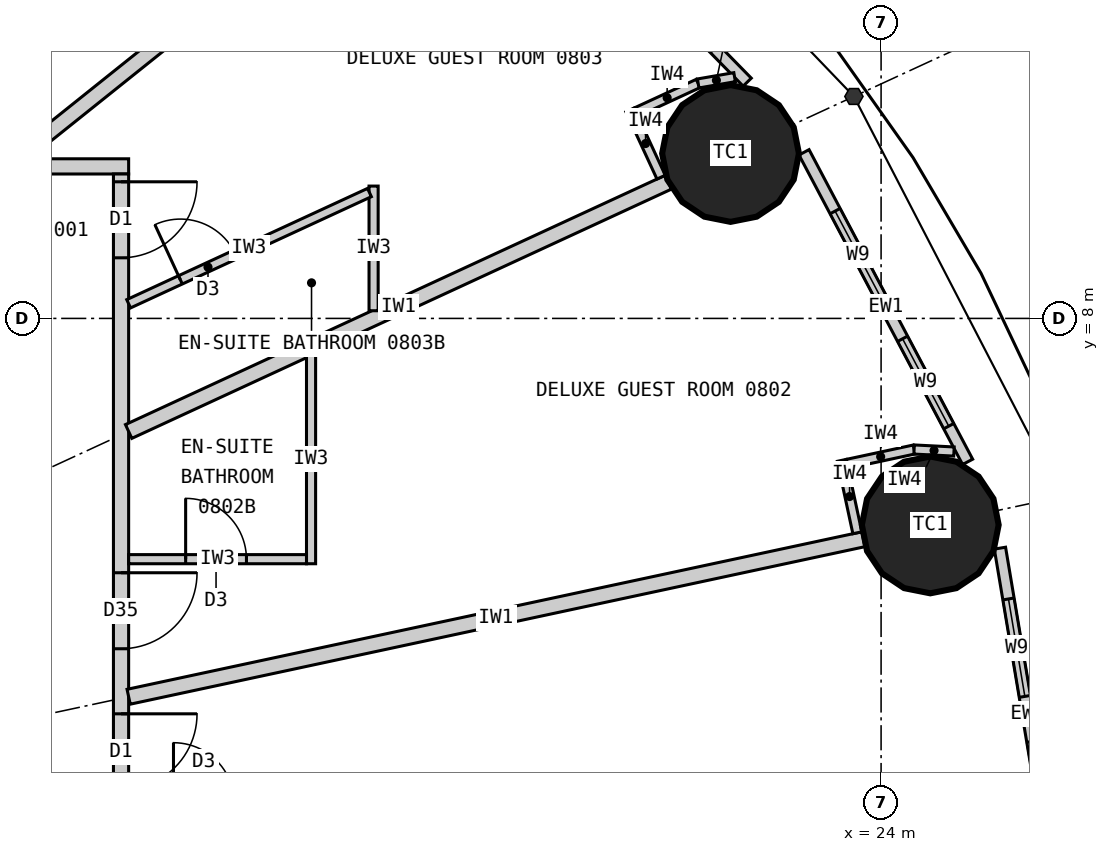
"""IFC4 building model, lengths in metres.
Left out: names, types, materials, properties, quantities, classifications, styles, units other than length and angle.
Written with IfcOpenShell. Run it as: python <this file> out.ifc"""

import sys

from ifc_helpers import new_model, si_unit, direction, frame, frame_2d, origin, origin_2d, place, context, subcontext, project, spatial, rectangle, circle, extrude, element, fill, save


model = new_model("IFC4")
c1 = context("Model", 3, precision=1e-05, world=origin(), true_north=direction((0.0, 1.0)))
c2 = subcontext(c1, "Body", "Model", "MODEL_VIEW")
j1 = project(units=[si_unit("LENGTHUNIT", "METRE"), si_unit("PLANEANGLEUNIT", "RADIAN")], contexts=[c1])
p1 = place(None, origin())
s1 = spatial("IfcSite", under=j1, at=p1, CompositionType="ELEMENT")
p2 = place(p1, origin())
s2 = spatial("IfcBuilding", under=s1, at=p2, CompositionType="ELEMENT")
p3 = place(p2, frame((0.0, 0.0, 39.3)))
s3 = spatial("IfcBuildingStorey", under=s2, at=p3, CompositionType="ELEMENT", Elevation=39.3)
for number, where, z_axis, x_axis in (
    (1, (24.647, 5.283, 0.0), (0.0, 0.0, 1.0), (1.0, 0.0, 0.0)),
    (2, (22.019, 10.17, 0.0), (0.0, 0.0, 1.0), (1.0, 0.0, 0.0)),
):
    element("IfcColumn", number, at=place(p3, frame(where, z_axis=z_axis, x_axis=x_axis)), inside=s3, PredefinedType="COLUMN", context=c2, shape_type="SweptSolid", body=[
        extrude(circle(Radius=0.9, at=origin_2d()), origin(), (0.0, 0.0, 1.0), 3.3),
    ])
p4 = place(p3, frame((26.297, 0.611, 0.0), z_axis=(0.0, 0.0, 1.0), x_axis=(-0.165641751141, 0.986185991727, 0.0)))
e3 = element("IfcWall", 3, at=p4, inside=s3, PredefinedType="ELEMENTEDWALL", context=c2, shape_type="SweptSolid", body=[
    extrude(rectangle(XDim=4.428, YDim=0.15, at=frame_2d((2.214, 0.0))), origin(), (0.0, 0.0, 1.0), 3.12),
])
p5 = place(p4, frame((0.55, 0.0, 0.9)))
e4 = element("IfcOpeningElement", 4, at=p5, cuts=e3, PredefinedType="OPENING", context=c2, shape_type="SweptSolid", body=[
    extrude(rectangle(XDim=1.3, YDim=1.9, at=frame_2d((0.65, 0.95))), frame((0.0, 0.085, 0.0), z_axis=(0.0, -1.0, 0.0), x_axis=(1.0, 0.0, 0.0)), (0.0, 0.0, 1.0), 0.17),
])
p6 = place(p4, frame((2.45, 0.0, 0.9)))
e5 = element("IfcOpeningElement", 5, at=p6, cuts=e3, PredefinedType="OPENING", context=c2, shape_type="SweptSolid", body=[
    extrude(rectangle(XDim=1.3, YDim=1.9, at=frame_2d((0.65, 0.95))), frame((0.0, 0.085, 0.0), z_axis=(0.0, -1.0, 0.0), x_axis=(1.0, 0.0, 0.0)), (0.0, 0.0, 1.0), 0.17),
])
p7 = place(p3, frame((25.139, 6.113, 0.0), z_axis=(0.0, 0.0, 1.0), x_axis=(-0.467303182954, 0.884097129959, 0.0)))
e6 = element("IfcWall", 6, at=p7, inside=s3, PredefinedType="ELEMENTEDWALL", context=c2, shape_type="SweptSolid", body=[
    extrude(rectangle(XDim=4.606, YDim=0.15, at=frame_2d((2.303, 0.0))), origin(), (0.0, 0.0, 1.0), 3.12),
])
p8 = place(p7, frame((0.531, 0.0, 0.9)))
e7 = element("IfcOpeningElement", 7, at=p8, cuts=e6, PredefinedType="OPENING", context=c2, shape_type="SweptSolid", body=[
    extrude(rectangle(XDim=1.3, YDim=1.9, at=frame_2d((0.65, 0.95))), frame((0.0, 0.085, 0.0), z_axis=(0.0, -1.0, 0.0), x_axis=(1.0, 0.0, 0.0)), (0.0, 0.0, 1.0), 0.17),
])
p9 = place(p7, frame((2.432, 0.0, 0.9)))
e8 = element("IfcOpeningElement", 8, at=p9, cuts=e6, PredefinedType="OPENING", context=c2, shape_type="SweptSolid", body=[
    extrude(rectangle(XDim=1.3, YDim=1.9, at=frame_2d((0.65, 0.95))), frame((0.0, 0.085, 0.0), z_axis=(0.0, -1.0, 0.0), x_axis=(1.0, 0.0, 0.0)), (0.0, 0.0, 1.0), 0.17),
])
p10 = place(p3, frame((22.239, 11.108, 0.0), z_axis=(0.0, 0.0, 1.0), x_axis=(-0.699612594083, 0.714522370679, 0.0)))
e9 = element("IfcWall", 9, at=p10, inside=s3, PredefinedType="ELEMENTEDWALL", context=c2, shape_type="SweptSolid", body=[
    extrude(rectangle(XDim=4.896, YDim=0.15, at=frame_2d((2.448, 0.0))), origin(), (0.0, 0.0, 1.0), 3.12),
])
p11 = place(p10, frame((0.619, 0.0, 0.9)))
e10 = element("IfcOpeningElement", 10, at=p11, cuts=e9, PredefinedType="OPENING", context=c2, shape_type="SweptSolid", body=[
    extrude(rectangle(XDim=1.3, YDim=1.9, at=frame_2d((0.65, 0.95))), frame((0.0, 0.085, 0.0), z_axis=(0.0, -1.0, 0.0), x_axis=(1.0, 0.0, 0.0)), (0.0, 0.0, 1.0), 0.17),
])
p12 = place(p10, frame((2.519, 0.0, 0.9)))
e11 = element("IfcOpeningElement", 11, at=p12, cuts=e9, PredefinedType="OPENING", context=c2, shape_type="SweptSolid", body=[
    extrude(rectangle(XDim=1.3, YDim=1.9, at=frame_2d((0.65, 0.95))), frame((0.0, 0.085, 0.0), z_axis=(0.0, -1.0, 0.0), x_axis=(1.0, 0.0, 0.0)), (0.0, 0.0, 1.0), 0.17),
])
p13 = place(p3, frame((-14.1, 10.0, 0.0), z_axis=(0.0, 0.0, 1.0), x_axis=(1.0, 0.0, 0.0)))
e12 = element("IfcWall", 12, at=p13, inside=s3, PredefinedType="PARTITIONING", context=c2, shape_type="SweptSolid", body=[
    extrude(rectangle(XDim=28.2, YDim=0.2, at=frame_2d((14.1, 0.0))), origin(), (0.0, 0.0, 1.0), 3.12),
])
p14 = place(p13, frame((23.477, 0.0, 0.0)))
e13 = element("IfcOpeningElement", 13, at=p14, cuts=e12, PredefinedType="OPENING", context=c2, shape_type="SweptSolid", body=[
    extrude(rectangle(XDim=1.0, YDim=2.2, at=frame_2d((0.5, 1.1))), frame((0.0, 0.11, 0.0), z_axis=(0.0, -1.0, 0.0), x_axis=(1.0, 0.0, 0.0)), (0.0, 0.0, 1.0), 0.22),
])
p15 = place(p13, frame((18.529, 0.0, 0.0)))
e14 = element("IfcOpeningElement", 14, at=p15, cuts=e12, PredefinedType="OPENING", context=c2, shape_type="SweptSolid", body=[
    extrude(rectangle(XDim=1.0, YDim=2.2, at=frame_2d((0.5, 1.1))), frame((0.0, 0.11, 0.0), z_axis=(0.0, -1.0, 0.0), x_axis=(1.0, 0.0, 0.0)), (0.0, 0.0, 1.0), 0.22),
])
p16 = place(p13, frame((14.623, 0.0, 0.0)))
e15 = element("IfcOpeningElement", 15, at=p16, cuts=e12, PredefinedType="OPENING", context=c2, shape_type="SweptSolid", body=[
    extrude(rectangle(XDim=1.0, YDim=2.2, at=frame_2d((0.5, 1.1))), frame((0.0, 0.11, 0.0), z_axis=(0.0, -1.0, 0.0), x_axis=(1.0, 0.0, 0.0)), (0.0, 0.0, 1.0), 0.22),
])
p17 = place(p13, frame((11.252, 0.0, 0.0)))
e16 = element("IfcOpeningElement", 16, at=p17, cuts=e12, PredefinedType="OPENING", context=c2, shape_type="SweptSolid", body=[
    extrude(rectangle(XDim=1.0, YDim=2.1, at=frame_2d((0.5, 1.05))), frame((0.0, 0.11, 0.0), z_axis=(0.0, -1.0, 0.0), x_axis=(1.0, 0.0, 0.0)), (0.0, 0.0, 1.0), 0.22),
])
p18 = place(p13, frame((8.671, 0.0, 0.0)))
e17 = element("IfcOpeningElement", 17, at=p18, cuts=e12, PredefinedType="OPENING", context=c2, shape_type="SweptSolid", body=[
    extrude(rectangle(XDim=1.0, YDim=2.2, at=frame_2d((0.5, 1.1))), frame((0.0, 0.11, 0.0), z_axis=(0.0, -1.0, 0.0), x_axis=(1.0, 0.0, 0.0)), (0.0, 0.0, 1.0), 0.22),
])
p19 = place(p13, frame((1.616, 0.0, 0.0)))
e18 = element("IfcOpeningElement", 18, at=p19, cuts=e12, PredefinedType="OPENING", context=c2, shape_type="SweptSolid", body=[
    extrude(rectangle(XDim=1.0, YDim=2.2, at=frame_2d((0.5, 1.1))), frame((0.0, 0.11, 0.0), z_axis=(0.0, -1.0, 0.0), x_axis=(1.0, 0.0, 0.0)), (0.0, 0.0, 1.0), 0.22),
])
p20 = place(p3, frame((14.0, -9.9, 0.0), z_axis=(0.0, 0.0, 1.0), x_axis=(0.0, 1.0, 0.0)))
e19 = element("IfcWall", 19, at=p20, inside=s3, PredefinedType="PARTITIONING", context=c2, shape_type="SweptSolid", body=[
    extrude(rectangle(XDim=19.8, YDim=0.2, at=frame_2d((9.9, 0.0))), origin(), (0.0, 0.0, 1.0), 3.12),
])
p21 = place(p20, frame((11.698, 0.0, 0.0)))
e20 = element("IfcOpeningElement", 20, at=p21, cuts=e19, PredefinedType="OPENING", context=c2, shape_type="SweptSolid", body=[
    extrude(rectangle(XDim=1.0, YDim=2.2, at=frame_2d((0.5, 1.1))), frame((0.0, 0.11, 0.0), z_axis=(0.0, -1.0, 0.0), x_axis=(1.0, 0.0, 0.0)), (0.0, 0.0, 1.0), 0.22),
])
p22 = place(p20, frame((13.554, 0.0, 0.0)))
e21 = element("IfcOpeningElement", 21, at=p22, cuts=e19, PredefinedType="OPENING", context=c2, shape_type="SweptSolid", body=[
    extrude(rectangle(XDim=1.0, YDim=2.0, at=frame_2d((0.5, 1.0))), frame((0.0, 0.11, 0.0), z_axis=(0.0, -1.0, 0.0), x_axis=(1.0, 0.0, 0.0)), (0.0, 0.0, 1.0), 0.22),
])
p23 = place(p20, frame((18.698, 0.0, 0.0)))
e22 = element("IfcOpeningElement", 22, at=p23, cuts=e19, PredefinedType="OPENING", context=c2, shape_type="SweptSolid", body=[
    extrude(rectangle(XDim=1.0, YDim=2.2, at=frame_2d((0.5, 1.1))), frame((0.0, 0.11, 0.0), z_axis=(0.0, -1.0, 0.0), x_axis=(1.0, 0.0, 0.0)), (0.0, 0.0, 1.0), 0.22),
])
p24 = place(p20, frame((0.975, 0.0, 0.0)))
e23 = element("IfcOpeningElement", 23, at=p24, cuts=e19, PredefinedType="OPENING", context=c2, shape_type="SweptSolid", body=[
    extrude(rectangle(XDim=1.0, YDim=2.2, at=frame_2d((0.5, 1.1))), frame((0.0, 0.11, 0.0), z_axis=(0.0, -1.0, 0.0), x_axis=(1.0, 0.0, 0.0)), (0.0, 0.0, 1.0), 0.22),
])
p25 = place(p20, frame((7.097, 0.0, 0.0)))
e24 = element("IfcOpeningElement", 24, at=p25, cuts=e19, PredefinedType="OPENING", context=c2, shape_type="SweptSolid", body=[
    extrude(rectangle(XDim=1.0, YDim=2.2, at=frame_2d((0.5, 1.1))), frame((0.0, 0.11, 0.0), z_axis=(0.0, -1.0, 0.0), x_axis=(1.0, 0.0, 0.0)), (0.0, 0.0, 1.0), 0.22),
])
p26 = place(p3, frame((14.1, 3.022, 0.0), z_axis=(0.0, 0.0, 1.0), x_axis=(0.977786510688, 0.209603290805, 0.0)))
e25 = element("IfcWall", 25, at=p26, inside=s3, PredefinedType="PARTITIONING", context=c2, shape_type="SweptSolid", body=[
    extrude(rectangle(XDim=9.887, YDim=0.2, at=frame_2d((4.943, 0.0))), origin(), (0.0, 0.0, 1.0), 2.32),
])
p27 = place(p3, frame((14.1, 6.512, 0.0), z_axis=(0.0, 0.0, 1.0), x_axis=(0.907842433118, 0.41931147925, 0.0)))
e26 = element("IfcWall", 26, at=p27, inside=s3, PredefinedType="PARTITIONING", context=c2, shape_type="SweptSolid", body=[
    extrude(rectangle(XDim=7.823, YDim=0.2, at=frame_2d((3.912, 0.0))), origin(), (0.0, 0.0, 1.0), 2.32),
])
p28 = place(p3, frame((12.625, 10.1, 0.0), z_axis=(0.0, 0.0, 1.0), x_axis=(0.780872884676, 0.624689953479, 0.0)))
e27 = element("IfcWall", 27, at=p28, inside=s3, PredefinedType="PARTITIONING", context=c2, shape_type="SweptSolid", body=[
    extrude(rectangle(XDim=5.845, YDim=0.2, at=frame_2d((2.922, 0.0))), origin(), (0.0, 0.0, 1.0), 2.32),
])
p29 = place(p3, frame((16.5, 7.521, 0.0), z_axis=(0.0, 0.0, 1.0), x_axis=(0.0, -1.0, 0.0)))
e28 = element("IfcWall", 28, at=p29, inside=s3, PredefinedType="PARTITIONING", context=c2, shape_type="SweptSolid", body=[
    extrude(rectangle(XDim=2.749, YDim=0.12, at=frame_2d((1.374, 0.0))), origin(), (0.0, 0.0, 1.0), 3.12),
])
p30 = place(p3, frame((14.1, 4.833, 0.0), z_axis=(0.0, 0.0, 1.0), x_axis=(1.0, 0.0, 0.0)))
e29 = element("IfcWall", 29, at=p30, inside=s3, PredefinedType="PARTITIONING", context=c2, shape_type="SweptSolid", body=[
    extrude(rectangle(XDim=2.34, YDim=0.12, at=frame_2d((1.17, 0.0))), origin(), (0.0, 0.0, 1.0), 3.12),
])
p31 = place(p30, frame((0.75, 0.0, 0.0)))
e30 = element("IfcOpeningElement", 30, at=p31, cuts=e29, PredefinedType="OPENING", context=c2, shape_type="SweptSolid", body=[
    extrude(rectangle(XDim=0.8, YDim=2.1, at=frame_2d((0.4, 1.05))), frame((0.0, 0.07, 0.0), z_axis=(0.0, -1.0, 0.0), x_axis=(1.0, 0.0, 0.0)), (0.0, 0.0, 1.0), 0.14),
])
p32 = place(p3, frame((17.323, 8.101, 0.0), z_axis=(0.0, 0.0, 1.0), x_axis=(0.0, 1.0, 0.0)))
e31 = element("IfcWall", 31, at=p32, inside=s3, PredefinedType="PARTITIONING", context=c2, shape_type="SweptSolid", body=[
    extrude(rectangle(XDim=1.64, YDim=0.12, at=frame_2d((0.82, 0.0))), origin(), (0.0, 0.0, 1.0), 3.12),
])
p33 = place(p3, frame((14.1, 8.193, 0.0), z_axis=(0.0, 0.0, 1.0), x_axis=(0.907836493557, 0.419324338628, 0.0)))
e32 = element("IfcWall", 32, at=p33, inside=s3, PredefinedType="PARTITIONING", context=c2, shape_type="SweptSolid", body=[
    extrude(rectangle(XDim=3.49, YDim=0.12, at=frame_2d((1.745, 0.0))), origin(), (0.0, 0.0, 1.0), 3.12),
])
p34 = place(p33, frame((0.75, 0.0, 0.0)))
e33 = element("IfcOpeningElement", 33, at=p34, cuts=e32, PredefinedType="OPENING", context=c2, shape_type="SweptSolid", body=[
    extrude(rectangle(XDim=0.8, YDim=2.1, at=frame_2d((0.4, 1.05))), frame((0.0, 0.07, 0.0), z_axis=(0.0, -1.0, 0.0), x_axis=(1.0, 0.0, 0.0)), (0.0, 0.0, 1.0), 0.14),
])
p35 = place(p3, frame((23.687, 5.18, 0.0), z_axis=(0.0, 0.0, 1.0), x_axis=(-0.209443540911, 0.977820741839, 0.0)))
e34 = element("IfcWall", 34, at=p35, inside=s3, PredefinedType="PARTITIONING", context=c2, shape_type="SweptSolid", body=[
    extrude(rectangle(XDim=0.975, YDim=0.12, at=frame_2d((0.487, 0.0))), origin(), (0.0, 0.0, 1.0), 3.12),
])
p36 = place(p3, frame((23.554, 6.087, 0.0), z_axis=(0.0, 0.0, 1.0), x_axis=(0.977762694187, 0.209714362543, 0.0)))
e35 = element("IfcWall", 35, at=p36, inside=s3, PredefinedType="PARTITIONING", context=c2, shape_type="SweptSolid", body=[
    extrude(rectangle(XDim=0.9, YDim=0.12, at=frame_2d((0.45, 0.0))), origin(), (0.0, 0.0, 1.0), 3.12),
])
p37 = place(p3, frame((24.434, 6.275, 0.0), z_axis=(0.0, 0.0, 1.0), x_axis=(0.998714959873, -0.050679669751, 0.0)))
e36 = element("IfcWall", 36, at=p37, inside=s3, PredefinedType="PARTITIONING", context=c2, shape_type="SweptSolid", body=[
    extrude(rectangle(XDim=0.525, YDim=0.12, at=frame_2d((0.263, 0.0))), origin(), (0.0, 0.0, 1.0), 3.12),
])
p38 = place(p3, frame((21.106, 9.858, 0.0), z_axis=(0.0, 0.0, 1.0), x_axis=(-0.419344098106, 0.907827366509, 0.0)))
e37 = element("IfcWall", 37, at=p38, inside=s3, PredefinedType="PARTITIONING", context=c2, shape_type="SweptSolid", body=[
    extrude(rectangle(XDim=0.975, YDim=0.12, at=frame_2d((0.487, 0.0))), origin(), (0.0, 0.0, 1.0), 3.12),
])
p39 = place(p3, frame((20.777, 10.714, 0.0), z_axis=(0.0, 0.0, 1.0), x_axis=(0.907832324198, 0.419333365166, 0.0)))
e38 = element("IfcWall", 38, at=p39, inside=s3, PredefinedType="PARTITIONING", context=c2, shape_type="SweptSolid", body=[
    extrude(rectangle(XDim=0.9, YDim=0.12, at=frame_2d((0.45, 0.0))), origin(), (0.0, 0.0, 1.0), 3.12),
])
p40 = place(p3, frame((21.594, 11.091, 0.0), z_axis=(0.0, 0.0, 1.0), x_axis=(0.985483306792, 0.169772353566, 0.0)))
e39 = element("IfcWall", 39, at=p40, inside=s3, PredefinedType="PARTITIONING", context=c2, shape_type="SweptSolid", body=[
    extrude(rectangle(XDim=0.486, YDim=0.12, at=frame_2d((0.243, 0.0))), origin(), (0.0, 0.0, 1.0), 3.12),
])
p41 = place(p6, origin())
e40 = element("IfcWindow", 40, at=p41, inside=s3, PartitioningType="SINGLE_PANEL", PredefinedType="WINDOW", context=c2, shape_type="SweptSolid", body=[
    extrude(rectangle(XDim=1.3, YDim=1.9, at=frame_2d((0.65, 0.95))), frame((0.0, 0.03, 0.0), z_axis=(0.0, -1.0, 0.0), x_axis=(1.0, 0.0, 0.0)), (0.0, 0.0, 1.0), 0.06),
])
fill(e5, e40)
p42 = place(p8, origin())
e41 = element("IfcWindow", 41, at=p42, inside=s3, PartitioningType="SINGLE_PANEL", PredefinedType="WINDOW", context=c2, shape_type="SweptSolid", body=[
    extrude(rectangle(XDim=1.3, YDim=1.9, at=frame_2d((0.65, 0.95))), frame((0.0, 0.03, 0.0), z_axis=(0.0, -1.0, 0.0), x_axis=(1.0, 0.0, 0.0)), (0.0, 0.0, 1.0), 0.06),
])
fill(e7, e41)
p43 = place(p9, origin())
e42 = element("IfcWindow", 42, at=p43, inside=s3, PartitioningType="SINGLE_PANEL", PredefinedType="WINDOW", context=c2, shape_type="SweptSolid", body=[
    extrude(rectangle(XDim=1.3, YDim=1.9, at=frame_2d((0.65, 0.95))), frame((0.0, 0.03, 0.0), z_axis=(0.0, -1.0, 0.0), x_axis=(1.0, 0.0, 0.0)), (0.0, 0.0, 1.0), 0.06),
])
fill(e8, e42)
p44 = place(p21, origin())
e43 = element("IfcDoor", 43, at=p44, inside=s3, OperationType="SINGLE_SWING_RIGHT", PredefinedType="DOOR", context=c2, shape_type="SweptSolid", body=[
    extrude(rectangle(XDim=1.0, YDim=2.2, at=frame_2d((0.5, 1.1))), frame((0.0, 0.025, 0.0), z_axis=(0.0, -1.0, 0.0), x_axis=(1.0, 0.0, 0.0)), (0.0, 0.0, 1.0), 0.05),
])
fill(e20, e43)
p45 = place(p31, origin())
e44 = element("IfcDoor", 44, at=p45, inside=s3, OperationType="SINGLE_SWING_LEFT", PredefinedType="DOOR", context=c2, shape_type="SweptSolid", body=[
    extrude(rectangle(XDim=0.8, YDim=2.1, at=frame_2d((0.4, 1.05))), frame((0.0, 0.025, 0.0), z_axis=(0.0, -1.0, 0.0), x_axis=(1.0, 0.0, 0.0)), (0.0, 0.0, 1.0), 0.05),
])
fill(e30, e44)
p46 = place(p22, origin())
e45 = element("IfcDoor", 45, at=p46, inside=s3, OperationType="SINGLE_SWING_RIGHT", PredefinedType="DOOR", context=c2, shape_type="SweptSolid", body=[
    extrude(rectangle(XDim=1.0, YDim=2.0, at=frame_2d((0.5, 1.0))), frame((0.0, 0.025, 0.0), z_axis=(0.0, -1.0, 0.0), x_axis=(1.0, 0.0, 0.0)), (0.0, 0.0, 1.0), 0.05),
])
fill(e21, e45)
p47 = place(p34, origin())
e46 = element("IfcDoor", 46, at=p47, inside=s3, OperationType="SINGLE_SWING_LEFT", PredefinedType="DOOR", context=c2, shape_type="SweptSolid", body=[
    extrude(rectangle(XDim=0.8, YDim=2.1, at=frame_2d((0.4, 1.05))), frame((0.0, 0.025, 0.0), z_axis=(0.0, -1.0, 0.0), x_axis=(1.0, 0.0, 0.0)), (0.0, 0.0, 1.0), 0.05),
])
fill(e33, e46)
p48 = place(p23, origin())
e47 = element("IfcDoor", 47, at=p48, inside=s3, OperationType="SINGLE_SWING_RIGHT", PredefinedType="DOOR", context=c2, shape_type="SweptSolid", body=[
    extrude(rectangle(XDim=1.0, YDim=2.2, at=frame_2d((0.5, 1.1))), frame((0.0, 0.025, 0.0), z_axis=(0.0, -1.0, 0.0), x_axis=(1.0, 0.0, 0.0)), (0.0, 0.0, 1.0), 0.05),
])
fill(e22, e47)
save(model, sys.argv[1])
